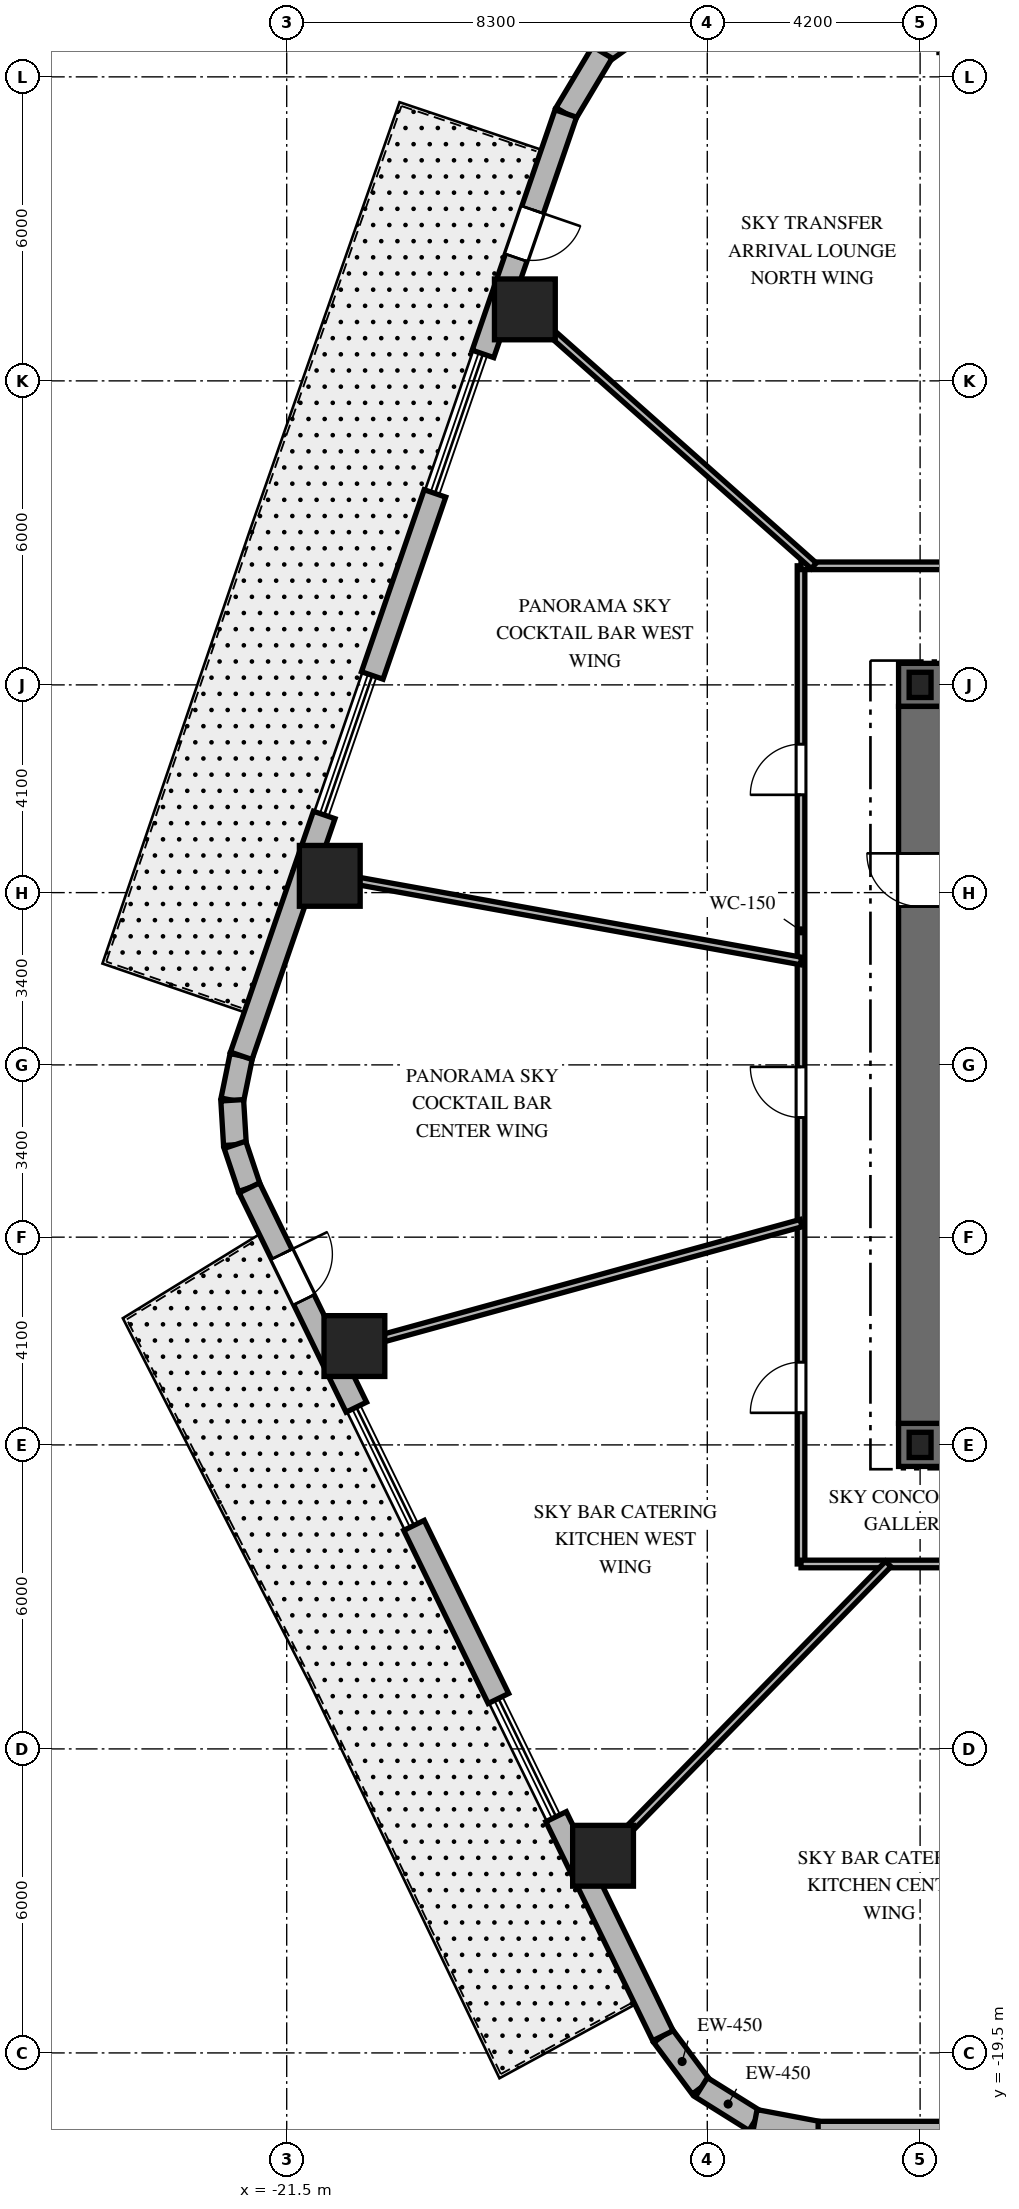
"""IFC4 building model, lengths in metres.
Left out: names, types, materials, properties, quantities, classifications, styles, units other than length and angle.
Written with IfcOpenShell. Run it as: python <this file> out.ifc"""

import sys

from ifc_helpers import new_model, si_unit, direction, frame, frame_2d, origin, origin_2d, place, context, subcontext, project, spatial, rectangle, i_section, extrude, element, fill, save


model = new_model("IFC4")
c1 = context("Model", 3, precision=1e-05, world=origin(), true_north=direction((0.0, 1.0)))
c2 = subcontext(c1, "Body", "Model", "MODEL_VIEW")
j1 = project(units=[si_unit("LENGTHUNIT", "METRE"), si_unit("PLANEANGLEUNIT", "RADIAN")], contexts=[c1])
p1 = place(None, origin())
s1 = spatial("IfcSite", under=j1, at=p1, CompositionType="ELEMENT")
p2 = place(p1, origin())
s2 = spatial("IfcBuilding", under=s1, at=p2, CompositionType="ELEMENT")
p3 = place(p2, frame((0.0, 0.0, 139.5)))
s3 = spatial("IfcBuildingStorey", under=s2, at=p3, CompositionType="ELEMENT", Elevation=139.5)
p4 = place(p3, frame((-9.425, -7.5, 0.0), z_axis=(0.0, 0.0, 1.0), x_axis=(1.0, 0.0, 0.0)))
e1 = element("IfcWall", 1, at=p4, inside=s3, PredefinedType="SHEAR", context=c2, shape_type="SweptSolid", body=[
    extrude(rectangle(XDim=18.85, YDim=0.85, at=frame_2d((9.425, 0.0))), origin(), (0.0, 0.0, 1.0), 4.8),
])
p5 = place(p4, frame((9.475, 0.0, 0.0)))
e2 = element("IfcOpeningElement", 2, at=p5, cuts=e1, PredefinedType="OPENING", context=c2, shape_type="SweptSolid", body=[
    extrude(rectangle(XDim=1.0, YDim=2.15, at=frame_2d((0.5, 1.075))), frame((0.0, 0.435, 0.0), z_axis=(0.0, -1.0, 0.0), x_axis=(1.0, 0.0, 0.0)), (0.0, 0.0, 1.0), 0.87),
])
p6 = place(p3, frame((-9.425, 7.5, 0.0), z_axis=(0.0, 0.0, 1.0), x_axis=(1.0, 0.0, 0.0)))
e3 = element("IfcWall", 3, at=p6, inside=s3, PredefinedType="SHEAR", context=c2, shape_type="SweptSolid", body=[
    extrude(rectangle(XDim=9.475, YDim=0.85, at=frame_2d((4.738, 0.0))), origin(), (0.0, 0.0, 1.0), 4.8),
])
p7 = place(p3, frame((-9.0, -7.075, 0.0), z_axis=(0.0, 0.0, 1.0), x_axis=(0.0, 1.0, 0.0)))
e4 = element("IfcWall", 4, at=p7, inside=s3, PredefinedType="SHEAR", context=c2, shape_type="SweptSolid", body=[
    extrude(rectangle(XDim=14.15, YDim=0.85, at=frame_2d((7.075, 0.0))), origin(), (0.0, 0.0, 1.0), 4.8),
])
p8 = place(p7, frame((10.2, 0.0, 0.0)))
e5 = element("IfcOpeningElement", 5, at=p8, cuts=e4, PredefinedType="OPENING", context=c2, shape_type="SweptSolid", body=[
    extrude(rectangle(XDim=1.05, YDim=2.15, at=frame_2d((0.525, 1.075))), frame((0.0, 0.435, 0.0), z_axis=(0.0, -1.0, 0.0), x_axis=(1.0, 0.0, 0.0)), (0.0, 0.0, 1.0), 0.87),
])
for number, where, z_axis, x_axis in (
    (6, (-9.0, -7.5, 0.0), (0.0, 0.0, 1.0), (1.0, 0.0, 0.0)),
    (7, (-9.0, 7.5, 0.0), (0.0, 0.0, 1.0), (1.0, 0.0, 0.0)),
):
    element("IfcColumn", number, at=place(p3, frame(where, z_axis=z_axis, x_axis=x_axis)), inside=s3, PredefinedType="COLUMN", context=c2, shape_type="SweptSolid", body=[
        extrude(i_section(OverallWidth=0.432, OverallDepth=0.498, WebThickness=0.056, FlangeThickness=0.089, at=origin_2d()), origin(), (0.0, 0.0, 1.0), 4.8),
    ])
for number, where, z_axis, x_axis in (
    (8, (-8.028, 20.58, 0.0), (0.0, 0.0, 1.0), (1.0, 0.0, 0.0)),
    (9, (-16.8, 14.911, 0.0), (0.0, 0.0, 1.0), (1.0, 0.0, 0.0)),
    (10, (-20.65, 3.731, 0.0), (0.0, 0.0, 1.0), (1.0, 0.0, 0.0)),
    (11, (-20.164, -5.549, 0.0), (0.0, 0.0, 1.0), (1.0, 0.0, 0.0)),
    (12, (-15.257, -15.609, 0.0), (0.0, 0.0, 1.0), (1.0, 0.0, 0.0)),
):
    element("IfcColumn", number, at=place(p3, frame(where, z_axis=z_axis, x_axis=x_axis)), inside=s3, PredefinedType="COLUMN", context=c2, shape_type="SweptSolid", body=[
        extrude(rectangle(XDim=1.2, YDim=1.2, at=origin_2d()), origin(), (0.0, 0.0, 1.0), 4.8),
    ])
p9 = place(p3, frame((-14.076, -19.161, 0.0), z_axis=(0.0, 0.0, 1.0), x_axis=(0.597226657159, -0.802072515412, 0.0)))
e13 = element("IfcWall", 13, at=p9, inside=s3, PredefinedType="SOLIDWALL", context=c2, shape_type="SweptSolid", body=[
    extrude(rectangle(XDim=1.269, YDim=0.45, at=frame_2d((0.635, 0.0))), origin(), (0.0, 0.0, 1.0), 4.5),
])
p10 = place(p3, frame((-13.318, -20.179, 0.0), z_axis=(0.0, 0.0, 1.0), x_axis=(0.848031272749, -0.529946186362, 0.0)))
e14 = element("IfcWall", 14, at=p10, inside=s3, PredefinedType="SOLIDWALL", context=c2, shape_type="SweptSolid", body=[
    extrude(rectangle(XDim=1.248, YDim=0.45, at=frame_2d((0.624, 0.0))), origin(), (0.0, 0.0, 1.0), 4.5),
])
p11 = place(p3, frame((-12.259, -20.84, 0.0), z_axis=(0.0, 0.0, 1.0), x_axis=(0.982730354425, -0.185043374624, 0.0)))
e15 = element("IfcWall", 15, at=p11, inside=s3, PredefinedType="SOLIDWALL", context=c2, shape_type="SweptSolid", body=[
    extrude(rectangle(XDim=1.269, YDim=0.45, at=frame_2d((0.635, 0.0))), origin(), (0.0, 0.0, 1.0), 4.5),
])
p12 = place(p3, frame((-14.146, 20.787, 0.0), z_axis=(0.0, 0.0, 1.0), x_axis=(-0.814162929117, -0.580636482536, 0.0)))
e16 = element("IfcWall", 16, at=p12, inside=s3, PredefinedType="SOLIDWALL", context=c2, shape_type="SweptSolid", body=[
    extrude(rectangle(XDim=1.382, YDim=0.45, at=frame_2d((0.691, 0.0))), origin(), (0.0, 0.0, 1.0), 4.5),
])
p13 = place(p3, frame((-15.272, 19.984, 0.0), z_axis=(0.0, 0.0, 1.0), x_axis=(-0.512579347361, -0.858639862025, 0.0)))
e17 = element("IfcWall", 17, at=p13, inside=s3, PredefinedType="SOLIDWALL", context=c2, shape_type="SweptSolid", body=[
    extrude(rectangle(XDim=1.406, YDim=0.45, at=frame_2d((0.703, 0.0))), origin(), (0.0, 0.0, 1.0), 4.5),
])
p14 = place(p3, frame((-22.397, 0.179, 0.0), z_axis=(0.0, 0.0, 1.0), x_axis=(-0.199313589404, -0.979935759669, 0.0)))
e18 = element("IfcWall", 18, at=p14, inside=s3, PredefinedType="SOLIDWALL", context=c2, shape_type="SweptSolid", body=[
    extrude(rectangle(XDim=0.896, YDim=0.45, at=frame_2d((0.448, 0.0))), origin(), (0.0, 0.0, 1.0), 4.5),
])
p15 = place(p3, frame((-22.575, -0.698, 0.0), z_axis=(0.0, 0.0, 1.0), x_axis=(0.060980441946, -0.998138961117, 0.0)))
e19 = element("IfcWall", 19, at=p15, inside=s3, PredefinedType="SOLIDWALL", context=c2, shape_type="SweptSolid", body=[
    extrude(rectangle(XDim=0.881, YDim=0.45, at=frame_2d((0.44, 0.0))), origin(), (0.0, 0.0, 1.0), 4.5),
])
p16 = place(p3, frame((-22.522, -1.577, 0.0), z_axis=(0.0, 0.0, 1.0), x_axis=(0.317372694837, -0.948300887151, 0.0)))
e20 = element("IfcWall", 20, at=p16, inside=s3, PredefinedType="SOLIDWALL", context=c2, shape_type="SweptSolid", body=[
    extrude(rectangle(XDim=0.896, YDim=0.45, at=frame_2d((0.448, 0.0))), origin(), (0.0, 0.0, 1.0), 4.5),
])
p17 = place(p3, frame((-11.012, -21.075, 0.0), z_axis=(0.0, 0.0, 1.0), x_axis=(1.0, 0.0, 0.0)))
e21 = element("IfcWall", 21, at=p17, inside=s3, PredefinedType="SOLIDWALL", context=c2, shape_type="SweptSolid", body=[
    extrude(rectangle(XDim=5.946, YDim=0.45, at=frame_2d((2.973, 0.0))), origin(), (0.0, 0.0, 1.0), 4.5),
])
p18 = place(p3, frame((-15.992, 18.777, 0.0), z_axis=(0.0, 0.0, 1.0), x_axis=(-0.325626313688, -0.945498547769, 0.0)))
e22 = element("IfcWall", 22, at=p18, inside=s3, PredefinedType="SOLIDWALL", context=c2, shape_type="SweptSolid", body=[
    extrude(rectangle(XDim=5.018, YDim=0.45, at=frame_2d((2.509, 0.0))), origin(), (0.0, 0.0, 1.0), 4.5),
])
p19 = place(p18, frame((2.009, 0.0, 0.0)))
e23 = element("IfcOpeningElement", 23, at=p19, cuts=e22, PredefinedType="OPENING", context=c2, shape_type="SweptSolid", body=[
    extrude(rectangle(XDim=1.0, YDim=2.15, at=frame_2d((0.5, 1.075))), frame((0.0, 0.235, 0.0), z_axis=(0.0, -1.0, 0.0), x_axis=(1.0, 0.0, 0.0)), (0.0, 0.0, 1.0), 0.47),
])
p20 = place(p3, frame((-18.574, 11.279, 0.0), z_axis=(0.0, 0.0, 1.0), x_axis=(-0.325598625093, -0.945508083169, 0.0)))
e24 = element("IfcWall", 24, at=p20, inside=s3, PredefinedType="SOLIDWALL", context=c2, shape_type="SweptSolid", body=[
    extrude(rectangle(XDim=3.8, YDim=0.45, at=frame_2d((1.9, 0.0))), origin(), (0.0, 0.0, 1.0), 4.5),
])
p21 = place(p3, frame((-20.76, 4.933, 0.0), z_axis=(0.0, 0.0, 1.0), x_axis=(-0.325594073587, -0.94550965053, 0.0)))
e25 = element("IfcWall", 25, at=p21, inside=s3, PredefinedType="SOLIDWALL", context=c2, shape_type="SweptSolid", body=[
    extrude(rectangle(XDim=5.028, YDim=0.45, at=frame_2d((2.514, 0.0))), origin(), (0.0, 0.0, 1.0), 4.5),
])
p22 = place(p3, frame((-22.238, -2.427, 0.0), z_axis=(0.0, 0.0, 1.0), x_axis=(0.438370693728, -0.898794267272, 0.0)))
e26 = element("IfcWall", 26, at=p22, inside=s3, PredefinedType="SOLIDWALL", context=c2, shape_type="SweptSolid", body=[
    extrude(rectangle(XDim=4.816, YDim=0.45, at=frame_2d((2.408, 0.0))), origin(), (0.0, 0.0, 1.0), 4.5),
])
p23 = place(p22, frame((1.458, 0.0, 0.0)))
e27 = element("IfcOpeningElement", 27, at=p23, cuts=e26, PredefinedType="OPENING", context=c2, shape_type="SweptSolid", body=[
    extrude(rectangle(XDim=1.0, YDim=2.15, at=frame_2d((0.5, 1.075))), frame((0.0, 0.235, 0.0), z_axis=(0.0, -1.0, 0.0), x_axis=(1.0, 0.0, 0.0)), (0.0, 0.0, 1.0), 0.47),
])
p24 = place(p3, frame((-18.988, -9.088, 0.0), z_axis=(0.0, 0.0, 1.0), x_axis=(0.43837933929, -0.898790050503, 0.0)))
e28 = element("IfcWall", 28, at=p24, inside=s3, PredefinedType="SOLIDWALL", context=c2, shape_type="SweptSolid", body=[
    extrude(rectangle(XDim=3.801, YDim=0.45, at=frame_2d((1.9, 0.0))), origin(), (0.0, 0.0, 1.0), 4.5),
])
p25 = place(p3, frame((-16.184, -14.838, 0.0), z_axis=(0.0, 0.0, 1.0), x_axis=(0.43837962648, -0.898789910428, 0.0)))
e29 = element("IfcWall", 29, at=p25, inside=s3, PredefinedType="SOLIDWALL", context=c2, shape_type="SweptSolid", body=[
    extrude(rectangle(XDim=4.81, YDim=0.45, at=frame_2d((2.405, 0.0))), origin(), (0.0, 0.0, 1.0), 4.5),
])
p26 = place(p3, frame((-11.35, -9.85, 0.0), z_axis=(0.0, 0.0, 1.0), x_axis=(0.0, 1.0, 0.0)))
e30 = element("IfcWall", 30, at=p26, inside=s3, PredefinedType="PARTITIONING", context=c2, shape_type="SweptSolid", body=[
    extrude(rectangle(XDim=19.7, YDim=0.15, at=frame_2d((9.85, 0.0))), origin(), (0.0, 0.0, 1.0), 2.69),
])
p27 = place(p26, frame((15.18, 0.0, 0.0)))
e31 = element("IfcOpeningElement", 31, at=p27, cuts=e30, PredefinedType="OPENING", context=c2, shape_type="SweptSolid", body=[
    extrude(rectangle(XDim=1.0, YDim=2.03, at=frame_2d((0.5, 1.015))), frame((0.0, 0.085, 0.0), z_axis=(0.0, -1.0, 0.0), x_axis=(1.0, 0.0, 0.0)), (0.0, 0.0, 1.0), 0.17),
])
p28 = place(p26, frame((8.811, 0.0, 0.0)))
e32 = element("IfcOpeningElement", 32, at=p28, cuts=e30, PredefinedType="OPENING", context=c2, shape_type="SweptSolid", body=[
    extrude(rectangle(XDim=1.0, YDim=2.03, at=frame_2d((0.5, 1.015))), frame((0.0, 0.085, 0.0), z_axis=(0.0, -1.0, 0.0), x_axis=(1.0, 0.0, 0.0)), (0.0, 0.0, 1.0), 0.17),
])
p29 = place(p26, frame((2.983, 0.0, 0.0)))
e33 = element("IfcOpeningElement", 33, at=p29, cuts=e30, PredefinedType="OPENING", context=c2, shape_type="SweptSolid", body=[
    extrude(rectangle(XDim=1.0, YDim=2.03, at=frame_2d((0.5, 1.015))), frame((0.0, 0.085, 0.0), z_axis=(0.0, -1.0, 0.0), x_axis=(1.0, 0.0, 0.0)), (0.0, 0.0, 1.0), 0.17),
])
p30 = place(p3, frame((-11.35, 9.85, 0.0), z_axis=(0.0, 0.0, 1.0), x_axis=(1.0, 0.0, 0.0)))
e34 = element("IfcWall", 34, at=p30, inside=s3, PredefinedType="PARTITIONING", context=c2, shape_type="SweptSolid", body=[
    extrude(rectangle(XDim=22.7, YDim=0.15, at=frame_2d((11.35, 0.0))), origin(), (0.0, 0.0, 1.0), 2.69),
])
p31 = place(p30, frame((17.212, 0.0, 0.0)))
e35 = element("IfcOpeningElement", 35, at=p31, cuts=e34, PredefinedType="OPENING", context=c2, shape_type="SweptSolid", body=[
    extrude(rectangle(XDim=1.0, YDim=2.03, at=frame_2d((0.5, 1.015))), frame((0.0, 0.085, 0.0), z_axis=(0.0, -1.0, 0.0), x_axis=(1.0, 0.0, 0.0)), (0.0, 0.0, 1.0), 0.17),
])
p32 = place(p30, frame((10.425, 0.0, 0.0)))
e36 = element("IfcOpeningElement", 36, at=p32, cuts=e34, PredefinedType="OPENING", context=c2, shape_type="SweptSolid", body=[
    extrude(rectangle(XDim=1.0, YDim=2.03, at=frame_2d((0.5, 1.015))), frame((0.0, 0.085, 0.0), z_axis=(0.0, -1.0, 0.0), x_axis=(1.0, 0.0, 0.0)), (0.0, 0.0, 1.0), 0.17),
])
p33 = place(p30, frame((3.374, 0.0, 0.0)))
e37 = element("IfcOpeningElement", 37, at=p33, cuts=e34, PredefinedType="OPENING", context=c2, shape_type="SweptSolid", body=[
    extrude(rectangle(XDim=1.0, YDim=2.03, at=frame_2d((0.5, 1.015))), frame((0.0, 0.085, 0.0), z_axis=(0.0, -1.0, 0.0), x_axis=(1.0, 0.0, 0.0)), (0.0, 0.0, 1.0), 0.17),
])
p34 = place(p3, frame((11.35, -9.85, 0.0), z_axis=(0.0, 0.0, 1.0), x_axis=(-1.0, 0.0, 0.0)))
e38 = element("IfcWall", 38, at=p34, inside=s3, PredefinedType="PARTITIONING", context=c2, shape_type="SweptSolid", body=[
    extrude(rectangle(XDim=22.7, YDim=0.15, at=frame_2d((11.35, 0.0))), origin(), (0.0, 0.0, 1.0), 2.69),
])
p35 = place(p34, frame((17.212, 0.0, 0.0)))
e39 = element("IfcOpeningElement", 39, at=p35, cuts=e38, PredefinedType="OPENING", context=c2, shape_type="SweptSolid", body=[
    extrude(rectangle(XDim=1.0, YDim=2.03, at=frame_2d((0.5, 1.015))), frame((0.0, 0.085, 0.0), z_axis=(0.0, -1.0, 0.0), x_axis=(1.0, 0.0, 0.0)), (0.0, 0.0, 1.0), 0.17),
])
p36 = place(p34, frame((10.425, 0.0, 0.0)))
e40 = element("IfcOpeningElement", 40, at=p36, cuts=e38, PredefinedType="OPENING", context=c2, shape_type="SweptSolid", body=[
    extrude(rectangle(XDim=1.0, YDim=2.03, at=frame_2d((0.5, 1.015))), frame((0.0, 0.085, 0.0), z_axis=(0.0, -1.0, 0.0), x_axis=(1.0, 0.0, 0.0)), (0.0, 0.0, 1.0), 0.17),
])
p37 = place(p34, frame((3.374, 0.0, 0.0)))
e41 = element("IfcOpeningElement", 41, at=p37, cuts=e38, PredefinedType="OPENING", context=c2, shape_type="SweptSolid", body=[
    extrude(rectangle(XDim=1.0, YDim=2.03, at=frame_2d((0.5, 1.015))), frame((0.0, 0.085, 0.0), z_axis=(0.0, -1.0, 0.0), x_axis=(1.0, 0.0, 0.0)), (0.0, 0.0, 1.0), 0.17),
])
p38 = place(p3, frame((-11.098, 9.85, 0.0), z_axis=(0.0, 0.0, 1.0), x_axis=(-0.747904295103, 0.663806572253, 0.0)))
e42 = element("IfcWall", 42, at=p38, inside=s3, PredefinedType="PARTITIONING", context=c2, shape_type="SweptSolid", body=[
    extrude(rectangle(XDim=8.16, YDim=0.15, at=frame_2d((4.08, 0.0))), origin(), (0.0, 0.0, 1.0), 2.69),
])
p39 = place(p3, frame((-11.35, 2.051, 0.0), z_axis=(0.0, 0.0, 1.0), x_axis=(-0.984068313063, 0.177790762484, 0.0)))
e43 = element("IfcWall", 43, at=p39, inside=s3, PredefinedType="PARTITIONING", context=c2, shape_type="SweptSolid", body=[
    extrude(rectangle(XDim=9.951, YDim=0.15, at=frame_2d((4.976, 0.0))), origin(), (0.0, 0.0, 1.0), 2.69),
])
p40 = place(p3, frame((-11.35, -3.123, 0.0), z_axis=(0.0, 0.0, 1.0), x_axis=(-0.964151983214, -0.265350623261, 0.0)))
e44 = element("IfcWall", 44, at=p40, inside=s3, PredefinedType="PARTITIONING", context=c2, shape_type="SweptSolid", body=[
    extrude(rectangle(XDim=9.645, YDim=0.15, at=frame_2d((4.823, 0.0))), origin(), (0.0, 0.0, 1.0), 2.69),
])
p41 = place(p3, frame((-9.628, -9.85, 0.0), z_axis=(0.0, 0.0, 1.0), x_axis=(-0.698992824326, -0.715128681805, 0.0)))
e45 = element("IfcWall", 45, at=p41, inside=s3, PredefinedType="PARTITIONING", context=c2, shape_type="SweptSolid", body=[
    extrude(rectangle(XDim=8.579, YDim=0.15, at=frame_2d((4.29, 0.0))), origin(), (0.0, 0.0, 1.0), 2.69),
])
p42 = place(p19, origin())
e46 = element("IfcDoor", 46, at=p42, inside=s3, OperationType="SINGLE_SWING_LEFT", PredefinedType="DOOR", context=c2, shape_type="SweptSolid", body=[
    extrude(rectangle(XDim=1.0, YDim=2.15, at=frame_2d((0.5, 1.075))), frame((0.0, 0.025, 0.0), z_axis=(0.0, -1.0, 0.0), x_axis=(1.0, 0.0, 0.0)), (0.0, 0.0, 1.0), 0.05),
])
fill(e23, e46)
p43 = place(p23, origin())
e47 = element("IfcDoor", 47, at=p43, inside=s3, OperationType="SINGLE_SWING_LEFT", PredefinedType="DOOR", context=c2, shape_type="SweptSolid", body=[
    extrude(rectangle(XDim=1.0, YDim=2.15, at=frame_2d((0.5, 1.075))), frame((0.0, 0.025, 0.0), z_axis=(0.0, -1.0, 0.0), x_axis=(1.0, 0.0, 0.0)), (0.0, 0.0, 1.0), 0.05),
])
fill(e27, e47)
p44 = place(p8, origin())
e48 = element("IfcDoor", 48, at=p44, inside=s3, OperationType="SINGLE_SWING_RIGHT", PredefinedType="DOOR", context=c2, shape_type="SweptSolid", body=[
    extrude(rectangle(XDim=1.05, YDim=2.15, at=frame_2d((0.525, 1.075))), frame((0.0, 0.025, 0.0), z_axis=(0.0, -1.0, 0.0), x_axis=(1.0, 0.0, 0.0)), (0.0, 0.0, 1.0), 0.05),
])
fill(e5, e48)
p45 = place(p27, origin())
e49 = element("IfcDoor", 49, at=p45, inside=s3, OperationType="SINGLE_SWING_LEFT", PredefinedType="DOOR", context=c2, shape_type="SweptSolid", body=[
    extrude(rectangle(XDim=1.0, YDim=2.03, at=frame_2d((0.5, 1.015))), frame((0.0, 0.025, 0.0), z_axis=(0.0, -1.0, 0.0), x_axis=(1.0, 0.0, 0.0)), (0.0, 0.0, 1.0), 0.05),
])
fill(e31, e49)
p46 = place(p28, origin())
e50 = element("IfcDoor", 50, at=p46, inside=s3, OperationType="SINGLE_SWING_RIGHT", PredefinedType="DOOR", context=c2, shape_type="SweptSolid", body=[
    extrude(rectangle(XDim=1.0, YDim=2.03, at=frame_2d((0.5, 1.015))), frame((0.0, 0.025, 0.0), z_axis=(0.0, -1.0, 0.0), x_axis=(1.0, 0.0, 0.0)), (0.0, 0.0, 1.0), 0.05),
])
fill(e32, e50)
p47 = place(p29, origin())
e51 = element("IfcDoor", 51, at=p47, inside=s3, OperationType="SINGLE_SWING_LEFT", PredefinedType="DOOR", context=c2, shape_type="SweptSolid", body=[
    extrude(rectangle(XDim=1.0, YDim=2.03, at=frame_2d((0.5, 1.015))), frame((0.0, 0.025, 0.0), z_axis=(0.0, -1.0, 0.0), x_axis=(1.0, 0.0, 0.0)), (0.0, 0.0, 1.0), 0.05),
])
fill(e33, e51)
save(model, sys.argv[1])
